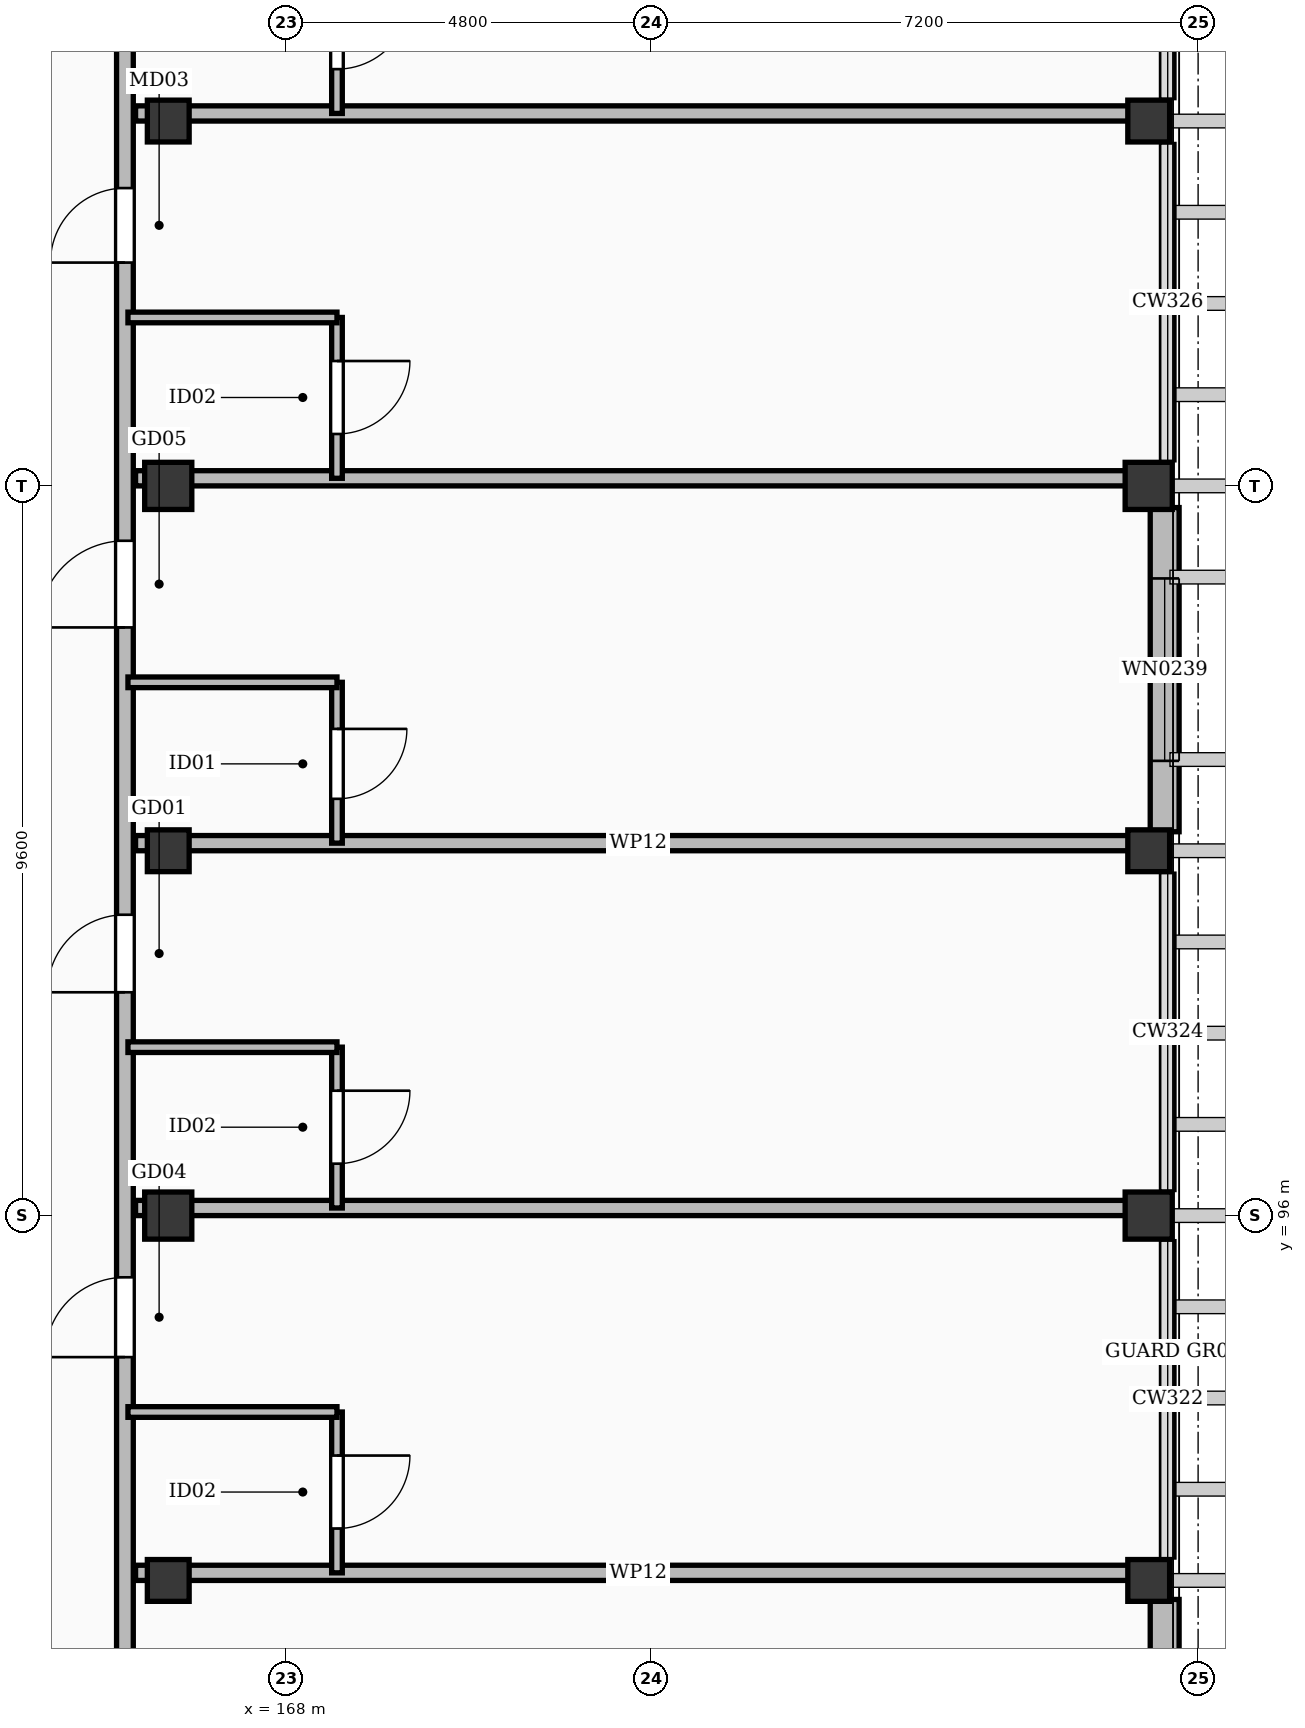
"""IFC4 building model, lengths in metres.
Left out: names, types, materials, properties, quantities, classifications, styles, units other than length and angle.
Written with IfcOpenShell. Run it as: python <this file> out.ifc"""

import sys

from ifc_helpers import new_model, si_unit, direction, frame, frame_2d, origin, origin_2d, place, context, subcontext, project, spatial, rectangle, extrude, element, fill, save


model = new_model("IFC4")
c1 = context("Model", 3, precision=1e-05, world=origin(), true_north=direction((0.0, 1.0)))
c2 = subcontext(c1, "Body", "Model", "MODEL_VIEW")
j1 = project(units=[si_unit("LENGTHUNIT", "METRE"), si_unit("PLANEANGLEUNIT", "RADIAN")], contexts=[c1])
p1 = place(None, origin())
s1 = spatial("IfcSite", under=j1, at=p1, CompositionType="ELEMENT")
p2 = place(p1, origin())
s2 = spatial("IfcBuilding", under=s1, at=p2, CompositionType="ELEMENT")
p3 = place(p2, frame((0.0, 0.0, 42.6)))
s3 = spatial("IfcBuildingStorey", under=s2, at=p3, CompositionType="ELEMENT", Elevation=42.6)
for number, where, z_axis, x_axis in (
    (1, (166.45, 96.0, 0.0), (0.0, 0.0, 1.0), (1.0, 0.0, 0.0)),
    (2, (166.45, 105.6, 0.0), (0.0, 0.0, 1.0), (1.0, 0.0, 0.0)),
    (3, (179.35, 96.0, 0.0), (0.0, 0.0, 1.0), (1.0, 0.0, 0.0)),
    (4, (179.35, 105.6, 0.0), (0.0, 0.0, 1.0), (1.0, 0.0, 0.0)),
):
    element("IfcColumn", number, at=place(p3, frame(where, z_axis=z_axis, x_axis=x_axis)), inside=s3, PredefinedType="COLUMN", context=c2, shape_type="SweptSolid", body=[
        extrude(rectangle(XDim=0.62, YDim=0.62, at=origin_2d()), origin(), (0.0, 0.0, 1.0), 3.9),
    ])
for number, where, z_axis, x_axis in (
    (5, (166.45, 91.2, 0.0), (0.0, 0.0, 1.0), (1.0, 0.0, 0.0)),
    (6, (166.45, 100.8, 0.0), (0.0, 0.0, 1.0), (1.0, 0.0, 0.0)),
    (7, (166.45, 110.4, 0.0), (0.0, 0.0, 1.0), (1.0, 0.0, 0.0)),
    (8, (179.35, 91.2, 0.0), (0.0, 0.0, 1.0), (1.0, 0.0, 0.0)),
    (9, (179.35, 100.8, 0.0), (0.0, 0.0, 1.0), (1.0, 0.0, 0.0)),
    (10, (179.35, 110.4, 0.0), (0.0, 0.0, 1.0), (1.0, 0.0, 0.0)),
):
    element("IfcColumn", number, at=place(p3, frame(where, z_axis=z_axis, x_axis=x_axis)), inside=s3, PredefinedType="COLUMN", context=c2, shape_type="SweptSolid", body=[
        extrude(rectangle(XDim=0.55, YDim=0.55, at=origin_2d()), origin(), (0.0, 0.0, 1.0), 3.9),
    ])
p4 = place(p3, frame((179.56, 90.95, 0.0), z_axis=(0.0, 0.0, 1.0), x_axis=(0.0, -1.0, 0.0)))
e11 = element("IfcWall", 11, at=p4, inside=s3, PredefinedType="SOLIDWALL", context=c2, shape_type="SweptSolid", body=[
    extrude(rectangle(XDim=4.265, YDim=0.38, at=frame_2d((2.132, 0.0))), origin(), (0.0, 0.0, 1.0), 2.902),
])
p5 = place(p4, frame((1.157, 0.0, 0.55)))
e12 = element("IfcOpeningElement", 12, at=p5, cuts=e11, PredefinedType="OPENING", context=c2, shape_type="SweptSolid", body=[
    extrude(rectangle(XDim=1.95, YDim=1.77, at=frame_2d((0.975, 0.885))), frame((0.0, 0.202, 0.0), z_axis=(0.0, -1.0, 0.0), x_axis=(1.0, 0.0, 0.0)), (0.0, 0.0, 1.0), 0.404),
])
p6 = place(p3, frame((179.56, 105.315, 0.0), z_axis=(0.0, 0.0, 1.0), x_axis=(0.0, -1.0, 0.0)))
e13 = element("IfcWall", 13, at=p6, inside=s3, PredefinedType="SOLIDWALL", context=c2, shape_type="SweptSolid", body=[
    extrude(rectangle(XDim=4.265, YDim=0.38, at=frame_2d((2.132, 0.0))), origin(), (0.0, 0.0, 1.0), 2.902),
])
p7 = place(p6, frame((0.933, 0.0, 0.55)))
e14 = element("IfcOpeningElement", 14, at=p7, cuts=e13, PredefinedType="OPENING", context=c2, shape_type="SweptSolid", body=[
    extrude(rectangle(XDim=2.4, YDim=1.8, at=frame_2d((1.2, 0.9))), frame((0.0, 0.202, 0.0), z_axis=(0.0, -1.0, 0.0), x_axis=(1.0, 0.0, 0.0)), (0.0, 0.0, 1.0), 0.404),
])
p8 = place(p3, frame((165.88, 62.75, 0.0), z_axis=(0.0, 0.0, 1.0), x_axis=(0.0, 1.0, 0.0)))
e15 = element("IfcWall", 15, at=p8, inside=s3, PredefinedType="PARTITIONING", context=c2, shape_type="SweptSolid", body=[
    extrude(rectangle(XDim=62.9, YDim=0.22, at=frame_2d((31.45, 0.0))), origin(), (0.0, 0.0, 1.0), 2.902),
])
p9 = place(p8, frame((0.691, 0.0, 0.0)))
e16 = element("IfcOpeningElement", 16, at=p9, cuts=e15, PredefinedType="OPENING", context=c2, shape_type="SweptSolid", body=[
    extrude(rectangle(XDim=1.05, YDim=2.22, at=frame_2d((0.525, 1.11))), frame((0.0, 0.122, 0.0), z_axis=(0.0, -1.0, 0.0), x_axis=(1.0, 0.0, 0.0)), (0.0, 0.0, 1.0), 0.244),
])
p10 = place(p8, frame((7.388, 0.0, 0.0)))
e17 = element("IfcOpeningElement", 17, at=p10, cuts=e15, PredefinedType="OPENING", context=c2, shape_type="SweptSolid", body=[
    extrude(rectangle(XDim=1.02, YDim=2.2, at=frame_2d((0.51, 1.1))), frame((0.0, 0.122, 0.0), z_axis=(0.0, -1.0, 0.0), x_axis=(1.0, 0.0, 0.0)), (0.0, 0.0, 1.0), 0.244),
])
p11 = place(p8, frame((12.188, 0.0, 0.0)))
e18 = element("IfcOpeningElement", 18, at=p11, cuts=e15, PredefinedType="OPENING", context=c2, shape_type="SweptSolid", body=[
    extrude(rectangle(XDim=1.14, YDim=2.26, at=frame_2d((0.57, 1.13))), frame((0.0, 0.122, 0.0), z_axis=(0.0, -1.0, 0.0), x_axis=(1.0, 0.0, 0.0)), (0.0, 0.0, 1.0), 0.244),
])
p12 = place(p8, frame((16.988, 0.0, 0.0)))
e19 = element("IfcOpeningElement", 19, at=p12, cuts=e15, PredefinedType="OPENING", context=c2, shape_type="SweptSolid", body=[
    extrude(rectangle(XDim=0.98, YDim=2.15, at=frame_2d((0.49, 1.075))), frame((0.0, 0.122, 0.0), z_axis=(0.0, -1.0, 0.0), x_axis=(1.0, 0.0, 0.0)), (0.0, 0.0, 1.0), 0.244),
])
p13 = place(p8, frame((21.788, 0.0, 0.0)))
e20 = element("IfcOpeningElement", 20, at=p13, cuts=e15, PredefinedType="OPENING", context=c2, shape_type="SweptSolid", body=[
    extrude(rectangle(XDim=1.28, YDim=2.16, at=frame_2d((0.64, 1.08))), frame((0.0, 0.122, 0.0), z_axis=(0.0, -1.0, 0.0), x_axis=(1.0, 0.0, 0.0)), (0.0, 0.0, 1.0), 0.244),
])
p14 = place(p8, frame((26.588, 0.0, 0.0)))
e21 = element("IfcOpeningElement", 21, at=p14, cuts=e15, PredefinedType="OPENING", context=c2, shape_type="SweptSolid", body=[
    extrude(rectangle(XDim=0.9, YDim=2.08, at=frame_2d((0.45, 1.04))), frame((0.0, 0.122, 0.0), z_axis=(0.0, -1.0, 0.0), x_axis=(1.0, 0.0, 0.0)), (0.0, 0.0, 1.0), 0.244),
])
p15 = place(p8, frame((31.388, 0.0, 0.0)))
e22 = element("IfcOpeningElement", 22, at=p15, cuts=e15, PredefinedType="OPENING", context=c2, shape_type="SweptSolid", body=[
    extrude(rectangle(XDim=1.05, YDim=2.22, at=frame_2d((0.525, 1.11))), frame((0.0, 0.122, 0.0), z_axis=(0.0, -1.0, 0.0), x_axis=(1.0, 0.0, 0.0)), (0.0, 0.0, 1.0), 0.244),
])
p16 = place(p8, frame((36.188, 0.0, 0.0)))
e23 = element("IfcOpeningElement", 23, at=p16, cuts=e15, PredefinedType="OPENING", context=c2, shape_type="SweptSolid", body=[
    extrude(rectangle(XDim=1.02, YDim=2.2, at=frame_2d((0.51, 1.1))), frame((0.0, 0.122, 0.0), z_axis=(0.0, -1.0, 0.0), x_axis=(1.0, 0.0, 0.0)), (0.0, 0.0, 1.0), 0.244),
])
p17 = place(p8, frame((40.988, 0.0, 0.0)))
e24 = element("IfcOpeningElement", 24, at=p17, cuts=e15, PredefinedType="OPENING", context=c2, shape_type="SweptSolid", body=[
    extrude(rectangle(XDim=1.14, YDim=2.26, at=frame_2d((0.57, 1.13))), frame((0.0, 0.122, 0.0), z_axis=(0.0, -1.0, 0.0), x_axis=(1.0, 0.0, 0.0)), (0.0, 0.0, 1.0), 0.244),
])
p18 = place(p8, frame((45.788, 0.0, 0.0)))
e25 = element("IfcOpeningElement", 25, at=p18, cuts=e15, PredefinedType="OPENING", context=c2, shape_type="SweptSolid", body=[
    extrude(rectangle(XDim=0.98, YDim=2.15, at=frame_2d((0.49, 1.075))), frame((0.0, 0.122, 0.0), z_axis=(0.0, -1.0, 0.0), x_axis=(1.0, 0.0, 0.0)), (0.0, 0.0, 1.0), 0.244),
])
p19 = place(p8, frame((50.588, 0.0, 0.0)))
e26 = element("IfcOpeningElement", 26, at=p19, cuts=e15, PredefinedType="OPENING", context=c2, shape_type="SweptSolid", body=[
    extrude(rectangle(XDim=1.28, YDim=2.16, at=frame_2d((0.64, 1.08))), frame((0.0, 0.122, 0.0), z_axis=(0.0, -1.0, 0.0), x_axis=(1.0, 0.0, 0.0)), (0.0, 0.0, 1.0), 0.244),
])
p20 = place(p8, frame((55.388, 0.0, 0.0)))
e27 = element("IfcOpeningElement", 27, at=p20, cuts=e15, PredefinedType="OPENING", context=c2, shape_type="SweptSolid", body=[
    extrude(rectangle(XDim=0.9, YDim=2.08, at=frame_2d((0.45, 1.04))), frame((0.0, 0.122, 0.0), z_axis=(0.0, -1.0, 0.0), x_axis=(1.0, 0.0, 0.0)), (0.0, 0.0, 1.0), 0.244),
])
p21 = place(p8, frame((60.188, 0.0, 0.0)))
e28 = element("IfcOpeningElement", 28, at=p21, cuts=e15, PredefinedType="OPENING", context=c2, shape_type="SweptSolid", body=[
    extrude(rectangle(XDim=1.05, YDim=2.22, at=frame_2d((0.525, 1.11))), frame((0.0, 0.122, 0.0), z_axis=(0.0, -1.0, 0.0), x_axis=(1.0, 0.0, 0.0)), (0.0, 0.0, 1.0), 0.244),
])
p22 = place(p3, frame((166.02, 91.3, 0.0), z_axis=(0.0, 0.0, 1.0), x_axis=(1.0, 0.0, 0.0)))
e29 = element("IfcWall", 29, at=p22, inside=s3, PredefinedType="PARTITIONING", context=c2, shape_type="SweptSolid", body=[
    extrude(rectangle(XDim=13.23, YDim=0.2, at=frame_2d((6.615, 0.0))), origin(), (0.0, 0.0, 1.0), 2.902),
])
p23 = place(p3, frame((168.67, 91.3, 0.0), z_axis=(0.0, 0.0, 1.0), x_axis=(0.0, 1.0, 0.0)))
e30 = element("IfcWall", 30, at=p23, inside=s3, PredefinedType="PARTITIONING", context=c2, shape_type="SweptSolid", body=[
    extrude(rectangle(XDim=2.116, YDim=0.14, at=frame_2d((1.058, 0.0))), origin(), (0.0, 0.0, 1.0), 3.072),
])
p24 = place(p23, frame((0.583, 0.0, 0.0)))
e31 = element("IfcOpeningElement", 31, at=p24, cuts=e30, PredefinedType="OPENING", context=c2, shape_type="SweptSolid", body=[
    extrude(rectangle(XDim=0.96, YDim=2.12, at=frame_2d((0.48, 1.06))), frame((0.0, 0.082, 0.0), z_axis=(0.0, -1.0, 0.0), x_axis=(1.0, 0.0, 0.0)), (0.0, 0.0, 1.0), 0.164),
])
p25 = place(p3, frame((165.92, 93.416, 0.0), z_axis=(0.0, 0.0, 1.0), x_axis=(1.0, 0.0, 0.0)))
e32 = element("IfcWall", 32, at=p25, inside=s3, PredefinedType="PARTITIONING", context=c2, shape_type="SweptSolid", body=[
    extrude(rectangle(XDim=2.75, YDim=0.14, at=frame_2d((1.375, 0.0))), origin(), (0.0, 0.0, 1.0), 3.072),
])
p26 = place(p3, frame((166.02, 96.1, 0.0), z_axis=(0.0, 0.0, 1.0), x_axis=(1.0, 0.0, 0.0)))
e33 = element("IfcWall", 33, at=p26, inside=s3, PredefinedType="PARTITIONING", context=c2, shape_type="SweptSolid", body=[
    extrude(rectangle(XDim=13.23, YDim=0.2, at=frame_2d((6.615, 0.0))), origin(), (0.0, 0.0, 1.0), 2.902),
])
p27 = place(p3, frame((168.67, 96.1, 0.0), z_axis=(0.0, 0.0, 1.0), x_axis=(0.0, 1.0, 0.0)))
e34 = element("IfcWall", 34, at=p27, inside=s3, PredefinedType="PARTITIONING", context=c2, shape_type="SweptSolid", body=[
    extrude(rectangle(XDim=2.116, YDim=0.14, at=frame_2d((1.058, 0.0))), origin(), (0.0, 0.0, 1.0), 3.072),
])
p28 = place(p27, frame((0.583, 0.0, 0.0)))
e35 = element("IfcOpeningElement", 35, at=p28, cuts=e34, PredefinedType="OPENING", context=c2, shape_type="SweptSolid", body=[
    extrude(rectangle(XDim=0.96, YDim=2.12, at=frame_2d((0.48, 1.06))), frame((0.0, 0.082, 0.0), z_axis=(0.0, -1.0, 0.0), x_axis=(1.0, 0.0, 0.0)), (0.0, 0.0, 1.0), 0.164),
])
p29 = place(p3, frame((165.92, 98.216, 0.0), z_axis=(0.0, 0.0, 1.0), x_axis=(1.0, 0.0, 0.0)))
e36 = element("IfcWall", 36, at=p29, inside=s3, PredefinedType="PARTITIONING", context=c2, shape_type="SweptSolid", body=[
    extrude(rectangle(XDim=2.75, YDim=0.14, at=frame_2d((1.375, 0.0))), origin(), (0.0, 0.0, 1.0), 3.072),
])
p30 = place(p3, frame((166.02, 100.9, 0.0), z_axis=(0.0, 0.0, 1.0), x_axis=(1.0, 0.0, 0.0)))
e37 = element("IfcWall", 37, at=p30, inside=s3, PredefinedType="PARTITIONING", context=c2, shape_type="SweptSolid", body=[
    extrude(rectangle(XDim=13.23, YDim=0.2, at=frame_2d((6.615, 0.0))), origin(), (0.0, 0.0, 1.0), 2.902),
])
p31 = place(p3, frame((168.67, 100.9, 0.0), z_axis=(0.0, 0.0, 1.0), x_axis=(0.0, 1.0, 0.0)))
e38 = element("IfcWall", 38, at=p31, inside=s3, PredefinedType="PARTITIONING", context=c2, shape_type="SweptSolid", body=[
    extrude(rectangle(XDim=2.116, YDim=0.14, at=frame_2d((1.058, 0.0))), origin(), (0.0, 0.0, 1.0), 3.072),
])
p32 = place(p31, frame((0.583, 0.0, 0.0)))
e39 = element("IfcOpeningElement", 39, at=p32, cuts=e38, PredefinedType="OPENING", context=c2, shape_type="SweptSolid", body=[
    extrude(rectangle(XDim=0.92, YDim=2.1, at=frame_2d((0.46, 1.05))), frame((0.0, 0.082, 0.0), z_axis=(0.0, -1.0, 0.0), x_axis=(1.0, 0.0, 0.0)), (0.0, 0.0, 1.0), 0.164),
])
p33 = place(p3, frame((165.92, 103.016, 0.0), z_axis=(0.0, 0.0, 1.0), x_axis=(1.0, 0.0, 0.0)))
e40 = element("IfcWall", 40, at=p33, inside=s3, PredefinedType="PARTITIONING", context=c2, shape_type="SweptSolid", body=[
    extrude(rectangle(XDim=2.75, YDim=0.14, at=frame_2d((1.375, 0.0))), origin(), (0.0, 0.0, 1.0), 3.072),
])
p34 = place(p3, frame((166.02, 105.7, 0.0), z_axis=(0.0, 0.0, 1.0), x_axis=(1.0, 0.0, 0.0)))
e41 = element("IfcWall", 41, at=p34, inside=s3, PredefinedType="PARTITIONING", context=c2, shape_type="SweptSolid", body=[
    extrude(rectangle(XDim=13.23, YDim=0.2, at=frame_2d((6.615, 0.0))), origin(), (0.0, 0.0, 1.0), 2.902),
])
p35 = place(p3, frame((168.67, 105.7, 0.0), z_axis=(0.0, 0.0, 1.0), x_axis=(0.0, 1.0, 0.0)))
e42 = element("IfcWall", 42, at=p35, inside=s3, PredefinedType="PARTITIONING", context=c2, shape_type="SweptSolid", body=[
    extrude(rectangle(XDim=2.116, YDim=0.14, at=frame_2d((1.058, 0.0))), origin(), (0.0, 0.0, 1.0), 3.072),
])
p36 = place(p35, frame((0.583, 0.0, 0.0)))
e43 = element("IfcOpeningElement", 43, at=p36, cuts=e42, PredefinedType="OPENING", context=c2, shape_type="SweptSolid", body=[
    extrude(rectangle(XDim=0.96, YDim=2.12, at=frame_2d((0.48, 1.06))), frame((0.0, 0.082, 0.0), z_axis=(0.0, -1.0, 0.0), x_axis=(1.0, 0.0, 0.0)), (0.0, 0.0, 1.0), 0.164),
])
p37 = place(p3, frame((165.92, 107.816, 0.0), z_axis=(0.0, 0.0, 1.0), x_axis=(1.0, 0.0, 0.0)))
e44 = element("IfcWall", 44, at=p37, inside=s3, PredefinedType="PARTITIONING", context=c2, shape_type="SweptSolid", body=[
    extrude(rectangle(XDim=2.75, YDim=0.14, at=frame_2d((1.375, 0.0))), origin(), (0.0, 0.0, 1.0), 3.072),
])
p38 = place(p3, frame((166.02, 110.5, 0.0), z_axis=(0.0, 0.0, 1.0), x_axis=(1.0, 0.0, 0.0)))
e45 = element("IfcWall", 45, at=p38, inside=s3, PredefinedType="PARTITIONING", context=c2, shape_type="SweptSolid", body=[
    extrude(rectangle(XDim=13.23, YDim=0.2, at=frame_2d((6.615, 0.0))), origin(), (0.0, 0.0, 1.0), 2.902),
])
p39 = place(p3, frame((168.67, 110.5, 0.0), z_axis=(0.0, 0.0, 1.0), x_axis=(0.0, 1.0, 0.0)))
e46 = element("IfcWall", 46, at=p39, inside=s3, PredefinedType="PARTITIONING", context=c2, shape_type="SweptSolid", body=[
    extrude(rectangle(XDim=2.116, YDim=0.14, at=frame_2d((1.058, 0.0))), origin(), (0.0, 0.0, 1.0), 3.072),
])
p40 = place(p39, frame((0.583, 0.0, 0.0)))
e47 = element("IfcOpeningElement", 47, at=p40, cuts=e46, PredefinedType="OPENING", context=c2, shape_type="SweptSolid", body=[
    extrude(rectangle(XDim=0.96, YDim=2.12, at=frame_2d((0.48, 1.06))), frame((0.0, 0.082, 0.0), z_axis=(0.0, -1.0, 0.0), x_axis=(1.0, 0.0, 0.0)), (0.0, 0.0, 1.0), 0.164),
])
p41 = place(p7, origin())
e48 = element("IfcWindow", 48, at=p41, inside=s3, PartitioningType="SINGLE_PANEL", PredefinedType="WINDOW", context=c2, shape_type="SweptSolid", body=[
    extrude(rectangle(XDim=2.4, YDim=1.8, at=frame_2d((1.2, 0.9))), frame((0.0, 0.03, 0.0), z_axis=(0.0, -1.0, 0.0), x_axis=(1.0, 0.0, 0.0)), (0.0, 0.0, 1.0), 0.06),
])
fill(e14, e48)
p42 = place(p15, origin())
e49 = element("IfcDoor", 49, at=p42, inside=s3, OperationType="SINGLE_SWING_LEFT", PredefinedType="DOOR", context=c2, shape_type="SweptSolid", body=[
    extrude(rectangle(XDim=1.05, YDim=2.22, at=frame_2d((0.525, 1.11))), frame((0.0, 0.025, 0.0), z_axis=(0.0, -1.0, 0.0), x_axis=(1.0, 0.0, 0.0)), (0.0, 0.0, 1.0), 0.05),
])
fill(e22, e49)
p43 = place(p24, frame((0.96, 0.0, 0.0), z_axis=(0.0, 0.0, 1.0), x_axis=(-1.0, 0.0, 0.0)))
e50 = element("IfcDoor", 50, at=p43, inside=s3, OperationType="SINGLE_SWING_RIGHT", PredefinedType="DOOR", context=c2, shape_type="SweptSolid", body=[
    extrude(rectangle(XDim=0.96, YDim=2.12, at=frame_2d((0.48, 1.06))), frame((0.0, 0.025, 0.0), z_axis=(0.0, -1.0, 0.0), x_axis=(1.0, 0.0, 0.0)), (0.0, 0.0, 1.0), 0.05),
])
fill(e31, e50)
p44 = place(p16, origin())
e51 = element("IfcDoor", 51, at=p44, inside=s3, OperationType="SINGLE_SWING_LEFT", PredefinedType="DOOR", context=c2, shape_type="SweptSolid", body=[
    extrude(rectangle(XDim=1.02, YDim=2.2, at=frame_2d((0.51, 1.1))), frame((0.0, 0.025, 0.0), z_axis=(0.0, -1.0, 0.0), x_axis=(1.0, 0.0, 0.0)), (0.0, 0.0, 1.0), 0.05),
])
fill(e23, e51)
p45 = place(p28, frame((0.96, 0.0, 0.0), z_axis=(0.0, 0.0, 1.0), x_axis=(-1.0, 0.0, 0.0)))
e52 = element("IfcDoor", 52, at=p45, inside=s3, OperationType="SINGLE_SWING_RIGHT", PredefinedType="DOOR", context=c2, shape_type="SweptSolid", body=[
    extrude(rectangle(XDim=0.96, YDim=2.12, at=frame_2d((0.48, 1.06))), frame((0.0, 0.025, 0.0), z_axis=(0.0, -1.0, 0.0), x_axis=(1.0, 0.0, 0.0)), (0.0, 0.0, 1.0), 0.05),
])
fill(e35, e52)
p46 = place(p17, origin())
e53 = element("IfcDoor", 53, at=p46, inside=s3, OperationType="SINGLE_SWING_LEFT", PredefinedType="DOOR", context=c2, shape_type="SweptSolid", body=[
    extrude(rectangle(XDim=1.14, YDim=2.26, at=frame_2d((0.57, 1.13))), frame((0.0, 0.025, 0.0), z_axis=(0.0, -1.0, 0.0), x_axis=(1.0, 0.0, 0.0)), (0.0, 0.0, 1.0), 0.05),
])
fill(e24, e53)
p47 = place(p32, frame((0.92, 0.0, 0.0), z_axis=(0.0, 0.0, 1.0), x_axis=(-1.0, 0.0, 0.0)))
e54 = element("IfcDoor", 54, at=p47, inside=s3, OperationType="SINGLE_SWING_RIGHT", PredefinedType="DOOR", context=c2, shape_type="SweptSolid", body=[
    extrude(rectangle(XDim=0.92, YDim=2.1, at=frame_2d((0.46, 1.05))), frame((0.0, 0.025, 0.0), z_axis=(0.0, -1.0, 0.0), x_axis=(1.0, 0.0, 0.0)), (0.0, 0.0, 1.0), 0.05),
])
fill(e39, e54)
p48 = place(p18, origin())
e55 = element("IfcDoor", 55, at=p48, inside=s3, OperationType="SINGLE_SWING_LEFT", PredefinedType="DOOR", context=c2, shape_type="SweptSolid", body=[
    extrude(rectangle(XDim=0.98, YDim=2.15, at=frame_2d((0.49, 1.075))), frame((0.0, 0.025, 0.0), z_axis=(0.0, -1.0, 0.0), x_axis=(1.0, 0.0, 0.0)), (0.0, 0.0, 1.0), 0.05),
])
fill(e25, e55)
p49 = place(p36, frame((0.96, 0.0, 0.0), z_axis=(0.0, 0.0, 1.0), x_axis=(-1.0, 0.0, 0.0)))
e56 = element("IfcDoor", 56, at=p49, inside=s3, OperationType="SINGLE_SWING_RIGHT", PredefinedType="DOOR", context=c2, shape_type="SweptSolid", body=[
    extrude(rectangle(XDim=0.96, YDim=2.12, at=frame_2d((0.48, 1.06))), frame((0.0, 0.025, 0.0), z_axis=(0.0, -1.0, 0.0), x_axis=(1.0, 0.0, 0.0)), (0.0, 0.0, 1.0), 0.05),
])
fill(e43, e56)
p50 = place(p40, frame((0.96, 0.0, 0.0), z_axis=(0.0, 0.0, 1.0), x_axis=(-1.0, 0.0, 0.0)))
e57 = element("IfcDoor", 57, at=p50, inside=s3, OperationType="SINGLE_SWING_RIGHT", PredefinedType="DOOR", context=c2, shape_type="SweptSolid", body=[
    extrude(rectangle(XDim=0.96, YDim=2.12, at=frame_2d((0.48, 1.06))), frame((0.0, 0.025, 0.0), z_axis=(0.0, -1.0, 0.0), x_axis=(1.0, 0.0, 0.0)), (0.0, 0.0, 1.0), 0.05),
])
fill(e47, e57)
save(model, sys.argv[1])
